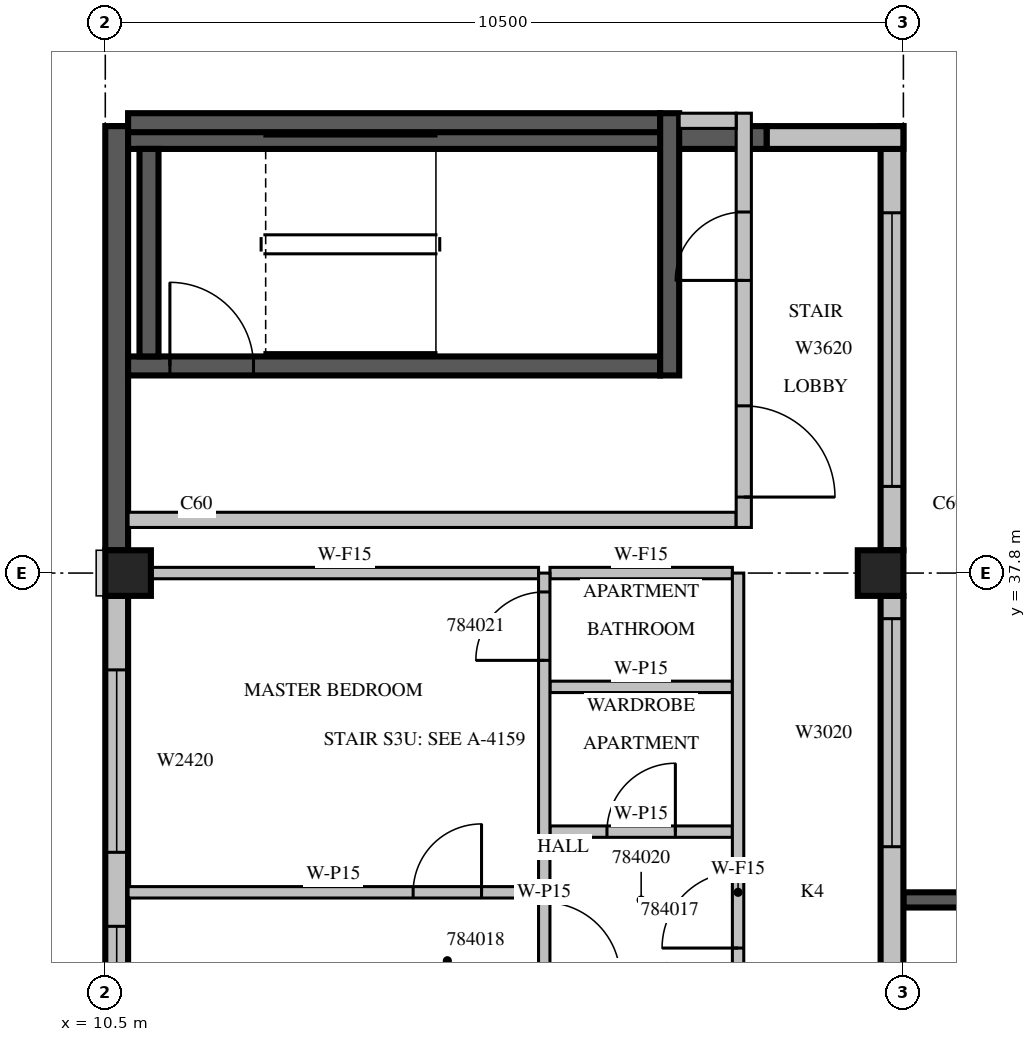
"""IFC4 building model, lengths in metres.
Left out: names, types, materials, properties, quantities, classifications, styles, units other than length and angle.
Written with IfcOpenShell. Run it as: python <this file> out.ifc"""

import sys

from ifc_helpers import new_model, si_unit, direction, frame, frame_2d, origin, origin_2d, place, context, subcontext, project, spatial, rectangle, extrude, source, transform, mapped, element, fill, save


model = new_model("IFC4")
c1 = context("Model", 3, precision=1e-05, world=origin(), true_north=direction((0.0, 1.0)))
c2 = subcontext(c1, "Body", "Model", "MODEL_VIEW")
j1 = project(units=[si_unit("LENGTHUNIT", "METRE"), si_unit("PLANEANGLEUNIT", "RADIAN")], contexts=[c1])
p1 = place(None, origin())
s1 = spatial("IfcSite", under=j1, at=p1, CompositionType="ELEMENT")
p2 = place(p1, origin())
s2 = spatial("IfcBuilding", under=s1, at=p2, CompositionType="ELEMENT")
p3 = place(p2, frame((0.0, 0.0, 354.5)))
s3 = spatial("IfcBuildingStorey", under=s2, at=p3, CompositionType="ELEMENT", Elevation=354.5)
m1 = source(origin(), c2, "Body", "SweptSolid", [
    extrude(rectangle(XDim=0.6, YDim=0.6, at=origin_2d()), origin(), (0.0, 0.0, 1.0), 3.5),
])
for number, where, z_axis, x_axis in (
    (1, (10.8, 37.8, 0.0), (0.0, 0.0, 1.0), (1.0, 0.0, 0.0)),
    (2, (20.7, 37.8, 0.0), (0.0, 0.0, 1.0), (1.0, 0.0, 0.0)),
):
    element("IfcColumn", number, at=place(p3, frame(where, z_axis=z_axis, x_axis=x_axis)), inside=s3, PredefinedType="COLUMN", context=c2, shape_type="MappedRepresentation", body=[
        mapped(m1, transform((0.0, 0.0, 0.0), scale=1.0)),
    ])
m2 = source(origin(), c2, "Body", "SweptSolid", [
    extrude(rectangle(XDim=3.9, YDim=0.2, at=frame_2d((1.95, 0.0))), origin(), (0.0, 0.0, 1.0), 3.1),
])
p4 = place(p3, frame((21.0, 33.5, 0.0), z_axis=(0.0, 0.0, 1.0), x_axis=(1.0, 0.0, 0.0)))
e3 = element("IfcWall", 3, at=p4, inside=s3, PredefinedType="SOLIDWALL", context=c2, shape_type="MappedRepresentation", body=[
    mapped(m2, transform((0.0, 0.0, 0.0), scale=1.0)),
])
m3 = source(origin(), c2, "Body", "SweptSolid", [
    extrude(rectangle(XDim=2.4, YDim=2.0, at=frame_2d((1.2, 1.0))), frame((0.0, 0.11, 0.0), z_axis=(0.0, -1.0, 0.0), x_axis=(1.0, 0.0, 0.0)), (0.0, 0.0, 1.0), 0.22),
])
p5 = place(p4, frame((0.75, 0.0, 0.6)))
e4 = element("IfcOpeningElement", 4, at=p5, cuts=e3, PredefinedType="OPENING", context=c2, shape_type="MappedRepresentation", body=[
    mapped(m3, transform((0.0, 0.0, 0.0), scale=1.0)),
])
m4 = source(origin(), c2, "Body", "SweptSolid", [
    extrude(rectangle(XDim=7.8, YDim=0.3, at=frame_2d((3.9, 0.0))), origin(), (0.0, 0.0, 1.0), 3.1),
])
p6 = place(p3, frame((20.85, 29.7, 0.0), z_axis=(0.0, 0.0, 1.0), x_axis=(0.0, 1.0, 0.0)))
e5 = element("IfcWall", 5, at=p6, inside=s3, PredefinedType="STANDARD", context=c2, shape_type="MappedRepresentation", body=[
    mapped(m4, transform((0.0, 0.0, 0.0), scale=1.0)),
])
m5 = source(origin(), c2, "Body", "SweptSolid", [
    extrude(rectangle(XDim=3.0, YDim=2.0, at=frame_2d((1.5, 1.0))), frame((0.0, 0.16, 0.0), z_axis=(0.0, -1.0, 0.0), x_axis=(1.0, 0.0, 0.0)), (0.0, 0.0, 1.0), 0.32),
])
p7 = place(p6, frame((4.5, 0.0, 0.6)))
e6 = element("IfcOpeningElement", 6, at=p7, cuts=e5, PredefinedType="OPENING", context=c2, shape_type="MappedRepresentation", body=[
    mapped(m5, transform((0.0, 0.0, 0.0), scale=1.0)),
])
m6 = source(origin(), c2, "Body", "SweptSolid", [
    extrude(rectangle(XDim=1.0, YDim=2.1, at=frame_2d((0.5, 1.05))), frame((0.0, 0.16, 0.0), z_axis=(0.0, -1.0, 0.0), x_axis=(1.0, 0.0, 0.0)), (0.0, 0.0, 1.0), 0.32),
])
p8 = place(p6, frame((1.3, 0.0, 0.0)))
e7 = element("IfcOpeningElement", 7, at=p8, cuts=e5, PredefinedType="OPENING", context=c2, shape_type="MappedRepresentation", body=[
    mapped(m6, transform((0.0, 0.0, 0.0), scale=1.0)),
])
m7 = source(origin(), c2, "Body", "SweptSolid", [
    extrude(rectangle(XDim=5.58, YDim=0.3, at=frame_2d((2.79, 0.0))), origin(), (0.0, 0.0, 1.0), 3.1),
])
p9 = place(p3, frame((20.85, 38.1, 0.0), z_axis=(0.0, 0.0, 1.0), x_axis=(0.0, 1.0, 0.0)))
e8 = element("IfcWall", 8, at=p9, inside=s3, PredefinedType="STANDARD", context=c2, shape_type="MappedRepresentation", body=[
    mapped(m7, transform((0.0, 0.0, 0.0), scale=1.0)),
])
m8 = source(origin(), c2, "Body", "SweptSolid", [
    extrude(rectangle(XDim=3.6, YDim=2.0, at=frame_2d((1.8, 1.0))), frame((0.0, 0.16, 0.0), z_axis=(0.0, -1.0, 0.0), x_axis=(1.0, 0.0, 0.0)), (0.0, 0.0, 1.0), 0.32),
])
p10 = place(p9, frame((0.84, 0.0, 0.6)))
e9 = element("IfcOpeningElement", 9, at=p10, cuts=e8, PredefinedType="OPENING", context=c2, shape_type="MappedRepresentation", body=[
    mapped(m8, transform((0.0, 0.0, 0.0), scale=1.0)),
])
m9 = source(origin(), c2, "Body", "SweptSolid", [
    extrude(rectangle(XDim=1.8, YDim=0.3, at=frame_2d((0.9, 0.0))), origin(), (0.0, 0.0, 1.0), 3.1),
])
p11 = place(p3, frame((21.0, 43.53, 0.0), z_axis=(0.0, 0.0, 1.0), x_axis=(-1.0, 0.0, 0.0)))
e10 = element("IfcWall", 10, at=p11, inside=s3, PredefinedType="STANDARD", context=c2, shape_type="MappedRepresentation", body=[
    mapped(m9, transform((0.0, 0.0, 0.0), scale=1.0)),
])
m10 = source(origin(), c2, "Body", "SweptSolid", [
    extrude(rectangle(XDim=8.6, YDim=0.3, at=frame_2d((4.3, 0.0))), origin(), (0.0, 0.0, 1.0), 3.1),
])
p12 = place(p3, frame((19.2, 43.53, 0.0), z_axis=(0.0, 0.0, 1.0), x_axis=(-1.0, 0.0, 0.0)))
e11 = element("IfcWall", 11, at=p12, inside=s3, PredefinedType="SOLIDWALL", context=c2, shape_type="MappedRepresentation", body=[
    mapped(m10, transform((0.0, 0.0, 0.0), scale=1.0)),
])
m11 = source(origin(), c2, "Body", "SweptSolid", [
    extrude(rectangle(XDim=5.58, YDim=0.3, at=frame_2d((2.79, 0.0))), origin(), (0.0, 0.0, 1.0), 3.1),
])
p13 = place(p3, frame((10.65, 43.68, 0.0), z_axis=(0.0, 0.0, 1.0), x_axis=(0.0, -1.0, 0.0)))
e12 = element("IfcWall", 12, at=p13, inside=s3, PredefinedType="SOLIDWALL", context=c2, shape_type="MappedRepresentation", body=[
    mapped(m11, transform((0.0, 0.0, 0.0), scale=1.0)),
])
p14 = place(p3, frame((10.65, 37.5, 0.0), z_axis=(0.0, 0.0, 1.0), x_axis=(0.0, -1.0, 0.0)))
e13 = element("IfcWall", 13, at=p14, inside=s3, PredefinedType="STANDARD", context=c2, shape_type="MappedRepresentation", body=[
    mapped(m4, transform((0.0, 0.0, 0.0), scale=1.0)),
])
m12 = source(origin(), c2, "Body", "SweptSolid", [
    extrude(rectangle(XDim=1.2, YDim=2.0, at=frame_2d((0.6, 1.0))), frame((0.0, 0.16, 0.0), z_axis=(0.0, -1.0, 0.0), x_axis=(1.0, 0.0, 0.0)), (0.0, 0.0, 1.0), 0.32),
])
p15 = place(p14, frame((4.348, 0.0, 0.6)))
e14 = element("IfcOpeningElement", 14, at=p15, cuts=e13, PredefinedType="OPENING", context=c2, shape_type="MappedRepresentation", body=[
    mapped(m12, transform((0.0, 0.0, 0.0), scale=1.0)),
])
m13 = source(origin(), c2, "Body", "SweptSolid", [
    extrude(rectangle(XDim=2.4, YDim=2.0, at=frame_2d((1.2, 1.0))), frame((0.0, 0.16, 0.0), z_axis=(0.0, -1.0, 0.0), x_axis=(1.0, 0.0, 0.0)), (0.0, 0.0, 1.0), 0.32),
])
p16 = place(p14, frame((0.974, 0.0, 0.6)))
e15 = element("IfcOpeningElement", 15, at=p16, cuts=e13, PredefinedType="OPENING", context=c2, shape_type="MappedRepresentation", body=[
    mapped(m13, transform((0.0, 0.0, 0.0), scale=1.0)),
])
m14 = source(origin(), c2, "Body", "SweptSolid", [
    extrude(rectangle(XDim=7.0, YDim=0.25, at=frame_2d((3.5, 0.0))), origin(), (0.0, 0.0, 1.0), 3.1),
])
p17 = place(p3, frame((10.8, 40.525, 0.0), z_axis=(0.0, 0.0, 1.0), x_axis=(1.0, 0.0, 0.0)))
e16 = element("IfcWall", 16, at=p17, inside=s3, PredefinedType="SOLIDWALL", context=c2, shape_type="MappedRepresentation", body=[
    mapped(m14, transform((0.0, 0.0, 0.0), scale=1.0)),
])
m15 = source(origin(), c2, "Body", "SweptSolid", [
    extrude(rectangle(XDim=1.1, YDim=2.1, at=frame_2d((0.55, 1.05))), frame((0.0, 0.135, 0.0), z_axis=(0.0, -1.0, 0.0), x_axis=(1.0, 0.0, 0.0)), (0.0, 0.0, 1.0), 0.27),
])
p18 = place(p17, frame((0.55, 0.0, 0.0)))
e17 = element("IfcOpeningElement", 17, at=p18, cuts=e16, PredefinedType="OPENING", context=c2, shape_type="MappedRepresentation", body=[
    mapped(m15, transform((0.0, 0.0, 0.0), scale=1.0)),
])
p19 = place(p3, frame((10.8, 43.725, 0.0), z_axis=(0.0, 0.0, 1.0), x_axis=(1.0, 0.0, 0.0)))
e18 = element("IfcWall", 18, at=p19, inside=s3, PredefinedType="SOLIDWALL", context=c2, shape_type="MappedRepresentation", body=[
    mapped(m14, transform((0.0, 0.0, 0.0), scale=1.0)),
])
m16 = source(origin(), c2, "Body", "SweptSolid", [
    extrude(rectangle(XDim=3.45, YDim=0.25, at=frame_2d((1.725, 0.0))), origin(), (0.0, 0.0, 1.0), 3.1),
])
p20 = place(p3, frame((17.925, 40.4, 0.0), z_axis=(0.0, 0.0, 1.0), x_axis=(0.0, 1.0, 0.0)))
e19 = element("IfcWall", 19, at=p20, inside=s3, PredefinedType="SOLIDWALL", context=c2, shape_type="MappedRepresentation", body=[
    mapped(m16, transform((0.0, 0.0, 0.0), scale=1.0)),
])
m17 = source(origin(), c2, "Body", "SweptSolid", [
    extrude(rectangle(XDim=2.73, YDim=0.25, at=frame_2d((1.365, 0.0))), origin(), (0.0, 0.0, 1.0), 3.1),
])
p21 = place(p3, frame((11.075, 40.65, 0.0), z_axis=(0.0, 0.0, 1.0), x_axis=(0.0, 1.0, 0.0)))
e20 = element("IfcWall", 20, at=p21, inside=s3, PredefinedType="SOLIDWALL", context=c2, shape_type="MappedRepresentation", body=[
    mapped(m17, transform((0.0, 0.0, 0.0), scale=1.0)),
])
m18 = source(origin(), c2, "Body", "SweptSolid", [
    extrude(rectangle(XDim=8.0, YDim=0.2, at=frame_2d((4.0, 0.0))), origin(), (0.0, 0.0, 1.0), 3.1),
])
p22 = place(p3, frame((10.8, 38.5, 0.0), z_axis=(0.0, 0.0, 1.0), x_axis=(1.0, 0.0, 0.0)))
e21 = element("IfcWall", 21, at=p22, inside=s3, PredefinedType="PARTITIONING", context=c2, shape_type="MappedRepresentation", body=[
    mapped(m18, transform((0.0, 0.0, 0.0), scale=1.0)),
])
m19 = source(origin(), c2, "Body", "SweptSolid", [
    extrude(rectangle(XDim=5.45, YDim=0.2, at=frame_2d((2.725, 0.0))), origin(), (0.0, 0.0, 1.0), 3.1),
])
p23 = place(p3, frame((18.9, 38.4, 0.0), z_axis=(0.0, 0.0, 1.0), x_axis=(0.0, 1.0, 0.0)))
e22 = element("IfcWall", 22, at=p23, inside=s3, PredefinedType="PARTITIONING", context=c2, shape_type="MappedRepresentation", body=[
    mapped(m19, transform((0.0, 0.0, 0.0), scale=1.0)),
])
m20 = source(origin(), c2, "Body", "SweptSolid", [
    extrude(rectangle(XDim=1.2, YDim=2.1, at=frame_2d((0.6, 1.05))), frame((0.0, 0.11, 0.0), z_axis=(0.0, -1.0, 0.0), x_axis=(1.0, 0.0, 0.0)), (0.0, 0.0, 1.0), 0.22),
])
p24 = place(p23, frame((0.4, 0.0, 0.0)))
e23 = element("IfcOpeningElement", 23, at=p24, cuts=e22, PredefinedType="OPENING", context=c2, shape_type="MappedRepresentation", body=[
    mapped(m20, transform((0.0, 0.0, 0.0), scale=1.0)),
])
m21 = source(origin(), c2, "Body", "SweptSolid", [
    extrude(rectangle(XDim=0.9, YDim=2.1, at=frame_2d((0.45, 1.05))), frame((0.0, 0.11, 0.0), z_axis=(0.0, -1.0, 0.0), x_axis=(1.0, 0.0, 0.0)), (0.0, 0.0, 1.0), 0.22),
])
p25 = place(p23, frame((3.25, 0.0, 0.0)))
e24 = element("IfcOpeningElement", 24, at=p25, cuts=e22, PredefinedType="OPENING", context=c2, shape_type="MappedRepresentation", body=[
    mapped(m21, transform((0.0, 0.0, 0.0), scale=1.0)),
])
m22 = source(origin(), c2, "Body", "SweptSolid", [
    extrude(rectangle(XDim=0.75, YDim=0.2, at=frame_2d((0.375, 0.0))), origin(), (0.0, 0.0, 1.0), 3.1),
])
p26 = place(p3, frame((18.05, 43.75, 0.0), z_axis=(0.0, 0.0, 1.0), x_axis=(1.0, 0.0, 0.0)))
e25 = element("IfcWall", 25, at=p26, inside=s3, PredefinedType="PARTITIONING", context=c2, shape_type="MappedRepresentation", body=[
    mapped(m22, transform((0.0, 0.0, 0.0), scale=1.0)),
])
m23 = source(origin(), c2, "Body", "SweptSolid", [
    extrude(rectangle(XDim=5.4, YDim=0.15, at=frame_2d((2.7, 0.0))), origin(), (0.0, 0.0, 1.0), 3.1),
])
p27 = place(p3, frame((16.2, 33.6, 0.0), z_axis=(0.0, 0.0, 1.0), x_axis=(-1.0, 0.0, 0.0)))
e26 = element("IfcWall", 26, at=p27, inside=s3, PredefinedType="PARTITIONING", context=c2, shape_type="MappedRepresentation", body=[
    mapped(m23, transform((0.0, 0.0, 0.0), scale=1.0)),
])
m24 = source(origin(), c2, "Body", "SweptSolid", [
    extrude(rectangle(XDim=0.9, YDim=2.1, at=frame_2d((0.45, 1.05))), frame((0.0, 0.085, 0.0), z_axis=(0.0, -1.0, 0.0), x_axis=(1.0, 0.0, 0.0)), (0.0, 0.0, 1.0), 0.17),
])
p28 = place(p27, frame((0.75, 0.0, 0.0)))
e27 = element("IfcOpeningElement", 27, at=p28, cuts=e26, PredefinedType="OPENING", context=c2, shape_type="MappedRepresentation", body=[
    mapped(m24, transform((0.0, 0.0, 0.0), scale=1.0)),
])
m25 = source(origin(), c2, "Body", "SweptSolid", [
    extrude(rectangle(XDim=2.4, YDim=0.15, at=frame_2d((1.2, 0.0))), origin(), (0.0, 0.0, 1.0), 3.1),
])
p29 = place(p3, frame((18.75, 34.398, 0.0), z_axis=(0.0, 0.0, 1.0), x_axis=(-1.0, 0.0, 0.0)))
e28 = element("IfcWall", 28, at=p29, inside=s3, PredefinedType="PARTITIONING", context=c2, shape_type="MappedRepresentation", body=[
    mapped(m25, transform((0.0, 0.0, 0.0), scale=1.0)),
])
p30 = place(p29, frame((0.75, 0.0, 0.0)))
e29 = element("IfcOpeningElement", 29, at=p30, cuts=e28, PredefinedType="OPENING", context=c2, shape_type="MappedRepresentation", body=[
    mapped(m24, transform((0.0, 0.0, 0.0), scale=1.0)),
])
p31 = place(p3, frame((18.75, 36.303, 0.0), z_axis=(0.0, 0.0, 1.0), x_axis=(-1.0, 0.0, 0.0)))
e30 = element("IfcWall", 30, at=p31, inside=s3, PredefinedType="PARTITIONING", context=c2, shape_type="MappedRepresentation", body=[
    mapped(m25, transform((0.0, 0.0, 0.0), scale=1.0)),
])
m26 = source(origin(), c2, "Body", "SweptSolid", [
    extrude(rectangle(XDim=5.101, YDim=0.15, at=frame_2d((2.55, 0.0))), origin(), (0.0, 0.0, 1.0), 3.1),
])
p32 = place(p3, frame((16.2, 37.8, 0.0), z_axis=(0.0, 0.0, 1.0), x_axis=(-1.0, 0.0, 0.0)))
e31 = element("IfcWall", 31, at=p32, inside=s3, PredefinedType="PARTITIONING", context=c2, shape_type="MappedRepresentation", body=[
    mapped(m26, transform((0.0, 0.0, 0.0), scale=1.0)),
])
p33 = place(p3, frame((18.75, 37.8, 0.0), z_axis=(0.0, 0.0, 1.0), x_axis=(-1.0, 0.0, 0.0)))
e32 = element("IfcWall", 32, at=p33, inside=s3, PredefinedType="PARTITIONING", context=c2, shape_type="MappedRepresentation", body=[
    mapped(m25, transform((0.0, 0.0, 0.0), scale=1.0)),
])
m27 = source(origin(), c2, "Body", "SweptSolid", [
    extrude(rectangle(XDim=8.4, YDim=0.15, at=frame_2d((4.2, 0.0))), origin(), (0.0, 0.0, 1.0), 3.1),
])
p34 = place(p3, frame((16.275, 29.4, 0.0), z_axis=(0.0, 0.0, 1.0), x_axis=(0.0, 1.0, 0.0)))
e33 = element("IfcWall", 33, at=p34, inside=s3, PredefinedType="PARTITIONING", context=c2, shape_type="MappedRepresentation", body=[
    mapped(m27, transform((0.0, 0.0, 0.0), scale=1.0)),
])
m28 = source(origin(), c2, "Body", "SweptSolid", [
    extrude(rectangle(XDim=1.0, YDim=2.1, at=frame_2d((0.5, 1.05))), frame((0.0, 0.085, 0.0), z_axis=(0.0, -1.0, 0.0), x_axis=(1.0, 0.0, 0.0)), (0.0, 0.0, 1.0), 0.17),
])
p35 = place(p34, frame((3.068, 0.0, 0.0)))
e34 = element("IfcOpeningElement", 34, at=p35, cuts=e33, PredefinedType="OPENING", context=c2, shape_type="MappedRepresentation", body=[
    mapped(m28, transform((0.0, 0.0, 0.0), scale=1.0)),
])
p36 = place(p34, frame((1.067, 0.0, 0.0)))
e35 = element("IfcOpeningElement", 35, at=p36, cuts=e33, PredefinedType="OPENING", context=c2, shape_type="MappedRepresentation", body=[
    mapped(m24, transform((0.0, 0.0, 0.0), scale=1.0)),
])
p37 = place(p34, frame((7.252, 0.0, 0.0)))
e36 = element("IfcOpeningElement", 36, at=p37, cuts=e33, PredefinedType="OPENING", context=c2, shape_type="MappedRepresentation", body=[
    mapped(m24, transform((0.0, 0.0, 0.0), scale=1.0)),
])
p38 = place(p3, frame((18.825, 29.4, 0.0), z_axis=(0.0, 0.0, 1.0), x_axis=(0.0, 1.0, 0.0)))
e37 = element("IfcWall", 37, at=p38, inside=s3, PredefinedType="PARTITIONING", context=c2, shape_type="MappedRepresentation", body=[
    mapped(m27, transform((0.0, 0.0, 0.0), scale=1.0)),
])
p39 = place(p38, frame((3.467, 0.0, 0.0)))
e38 = element("IfcOpeningElement", 38, at=p39, cuts=e37, PredefinedType="OPENING", context=c2, shape_type="MappedRepresentation", body=[
    mapped(m28, transform((0.0, 0.0, 0.0), scale=1.0)),
])
m29 = source(origin(), c2, "Body", "SweptSolid", [
    extrude(rectangle(XDim=3.0, YDim=2.0, at=frame_2d((1.5, 1.0))), frame((0.0, 0.03, 0.0), z_axis=(0.0, -1.0, 0.0), x_axis=(1.0, 0.0, 0.0)), (0.0, 0.0, 1.0), 0.06),
])
p40 = place(p7, origin())
e39 = element("IfcWindow", 39, at=p40, inside=s3, PartitioningType="SINGLE_PANEL", PredefinedType="WINDOW", context=c2, shape_type="MappedRepresentation", body=[
    mapped(m29, transform((0.0, 0.0, 0.0), scale=1.0)),
])
fill(e6, e39)
m30 = source(origin(), c2, "Body", "SweptSolid", [
    extrude(rectangle(XDim=3.6, YDim=2.0, at=frame_2d((1.8, 1.0))), frame((0.0, 0.03, 0.0), z_axis=(0.0, -1.0, 0.0), x_axis=(1.0, 0.0, 0.0)), (0.0, 0.0, 1.0), 0.06),
])
p41 = place(p10, origin())
e40 = element("IfcWindow", 40, at=p41, inside=s3, PartitioningType="SINGLE_PANEL", PredefinedType="WINDOW", context=c2, shape_type="MappedRepresentation", body=[
    mapped(m30, transform((0.0, 0.0, 0.0), scale=1.0)),
])
fill(e9, e40)
m31 = source(origin(), c2, "Body", "SweptSolid", [
    extrude(rectangle(XDim=1.2, YDim=2.0, at=frame_2d((0.6, 1.0))), frame((0.0, 0.03, 0.0), z_axis=(0.0, -1.0, 0.0), x_axis=(1.0, 0.0, 0.0)), (0.0, 0.0, 1.0), 0.06),
])
p42 = place(p15, origin())
e41 = element("IfcWindow", 41, at=p42, inside=s3, PartitioningType="SINGLE_PANEL", PredefinedType="WINDOW", context=c2, shape_type="MappedRepresentation", body=[
    mapped(m31, transform((0.0, 0.0, 0.0), scale=1.0)),
])
fill(e14, e41)
m32 = source(origin(), c2, "Body", "SweptSolid", [
    extrude(rectangle(XDim=2.4, YDim=2.0, at=frame_2d((1.2, 1.0))), frame((0.0, 0.03, 0.0), z_axis=(0.0, -1.0, 0.0), x_axis=(1.0, 0.0, 0.0)), (0.0, 0.0, 1.0), 0.06),
])
p43 = place(p16, origin())
e42 = element("IfcWindow", 42, at=p43, inside=s3, PartitioningType="SINGLE_PANEL", PredefinedType="WINDOW", context=c2, shape_type="MappedRepresentation", body=[
    mapped(m32, transform((0.0, 0.0, 0.0), scale=1.0)),
])
fill(e15, e42)
m33 = source(origin(), c2, "Body", "SweptSolid", [
    extrude(rectangle(XDim=1.1, YDim=2.1, at=frame_2d((0.55, 1.05))), frame((0.0, 0.025, 0.0), z_axis=(0.0, -1.0, 0.0), x_axis=(1.0, 0.0, 0.0)), (0.0, 0.0, 1.0), 0.05),
])
p44 = place(p18, origin())
e43 = element("IfcDoor", 43, at=p44, inside=s3, OperationType="SINGLE_SWING_LEFT", PredefinedType="DOOR", context=c2, shape_type="MappedRepresentation", body=[
    mapped(m33, transform((0.0, 0.0, 0.0), scale=1.0)),
])
fill(e17, e43)
m34 = source(origin(), c2, "Body", "SweptSolid", [
    extrude(rectangle(XDim=1.2, YDim=2.1, at=frame_2d((0.6, 1.05))), frame((0.0, 0.025, 0.0), z_axis=(0.0, -1.0, 0.0), x_axis=(1.0, 0.0, 0.0)), (0.0, 0.0, 1.0), 0.05),
])
p45 = place(p24, origin())
e44 = element("IfcDoor", 44, at=p45, inside=s3, OperationType="SINGLE_SWING_RIGHT", PredefinedType="DOOR", context=c2, shape_type="MappedRepresentation", body=[
    mapped(m34, transform((0.0, 0.0, 0.0), scale=1.0)),
])
fill(e23, e44)
m35 = source(origin(), c2, "Body", "SweptSolid", [
    extrude(rectangle(XDim=0.9, YDim=2.1, at=frame_2d((0.45, 1.05))), frame((0.0, 0.025, 0.0), z_axis=(0.0, -1.0, 0.0), x_axis=(1.0, 0.0, 0.0)), (0.0, 0.0, 1.0), 0.05),
])
p46 = place(p25, origin())
e45 = element("IfcDoor", 45, at=p46, inside=s3, OperationType="SINGLE_SWING_LEFT", PredefinedType="DOOR", context=c2, shape_type="MappedRepresentation", body=[
    mapped(m35, transform((0.0, 0.0, 0.0), scale=1.0)),
])
fill(e24, e45)
m36 = source(origin(), c2, "Body", "SweptSolid", [
    extrude(rectangle(XDim=1.0, YDim=2.1, at=frame_2d((0.5, 1.05))), frame((0.0, 0.025, 0.0), z_axis=(0.0, -1.0, 0.0), x_axis=(1.0, 0.0, 0.0)), (0.0, 0.0, 1.0), 0.05),
])
p47 = place(p39, origin())
e46 = element("IfcDoor", 46, at=p47, inside=s3, OperationType="SINGLE_SWING_LEFT", PredefinedType="DOOR", context=c2, shape_type="MappedRepresentation", body=[
    mapped(m36, transform((0.0, 0.0, 0.0), scale=1.0)),
])
fill(e38, e46)
p48 = place(p35, origin())
e47 = element("IfcDoor", 47, at=p48, inside=s3, OperationType="SINGLE_SWING_RIGHT", PredefinedType="DOOR", context=c2, shape_type="MappedRepresentation", body=[
    mapped(m36, transform((0.0, 0.0, 0.0), scale=1.0)),
])
fill(e34, e47)
p49 = place(p30, origin())
e48 = element("IfcDoor", 48, at=p49, inside=s3, OperationType="SINGLE_SWING_RIGHT", PredefinedType="DOOR", context=c2, shape_type="MappedRepresentation", body=[
    mapped(m35, transform((0.0, 0.0, 0.0), scale=1.0)),
])
fill(e29, e48)
p50 = place(p37, origin())
e49 = element("IfcDoor", 49, at=p50, inside=s3, OperationType="SINGLE_SWING_LEFT", PredefinedType="DOOR", context=c2, shape_type="MappedRepresentation", body=[
    mapped(m35, transform((0.0, 0.0, 0.0), scale=1.0)),
])
fill(e36, e49)
p51 = place(p28, origin())
e50 = element("IfcDoor", 50, at=p51, inside=s3, OperationType="SINGLE_SWING_RIGHT", PredefinedType="DOOR", context=c2, shape_type="MappedRepresentation", body=[
    mapped(m35, transform((0.0, 0.0, 0.0), scale=1.0)),
])
fill(e27, e50)
save(model, sys.argv[1])
